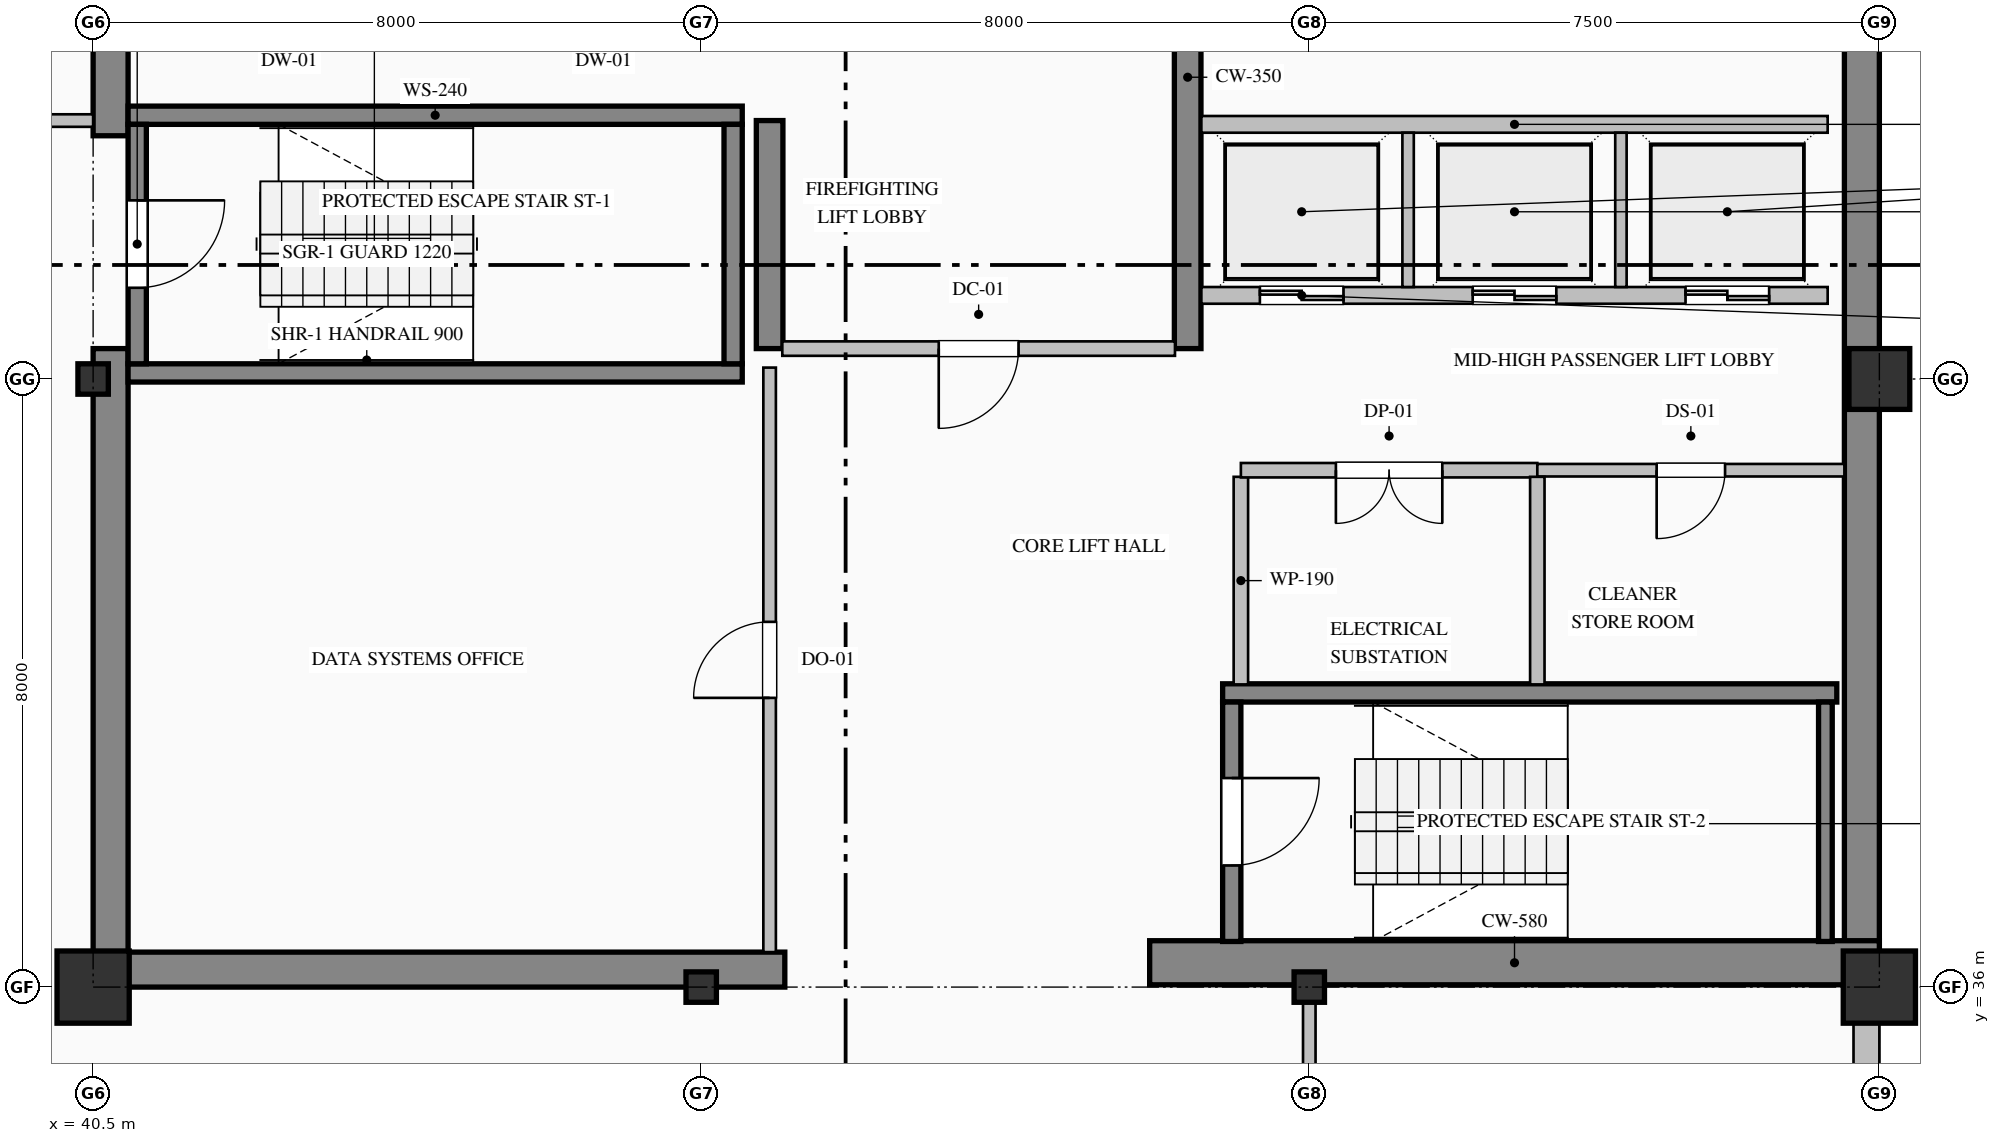
"""IFC4 building model, lengths in metres.
Left out: names, types, materials, properties, quantities, classifications, styles, units other than length and angle.
Written with IfcOpenShell. Run it as: python <this file> out.ifc"""

import sys

from ifc_helpers import new_model, si_unit, direction, frame, frame_2d, origin, origin_2d, place, context, subcontext, project, spatial, rectangle, hollow_rectangle, i_section, extrude, element, fill, save


model = new_model("IFC4")
c1 = context("Model", 3, precision=1e-05, world=origin(), true_north=direction((0.0, 1.0)))
c2 = subcontext(c1, "Body", "Model", "MODEL_VIEW")
j1 = project(units=[si_unit("LENGTHUNIT", "METRE"), si_unit("PLANEANGLEUNIT", "RADIAN")], contexts=[c1])
p1 = place(None, origin())
s1 = spatial("IfcSite", under=j1, at=p1, CompositionType="ELEMENT")
p2 = place(p1, origin())
s2 = spatial("IfcBuilding", under=s1, at=p2, CompositionType="ELEMENT")
p3 = place(p2, frame((0.0, 0.0, 217.8)))
s3 = spatial("IfcBuildingStorey", under=s2, at=p3, CompositionType="ELEMENT", Elevation=217.8)
p4 = place(p3, frame((63.77, 36.32, 0.0), z_axis=(0.0, 0.0, 1.0), x_axis=(0.0, 1.0, 0.0)))
e1 = element("IfcWall", 1, at=p4, inside=s3, PredefinedType="SHEAR", context=c2, shape_type="SweptSolid", body=[
    extrude(rectangle(XDim=15.22, YDim=0.46, at=frame_2d((7.61, 0.0))), origin(), (0.0, 0.0, 1.0), 3.775),
])
p5 = place(p3, frame((40.73, 36.46, 0.0), z_axis=(0.0, 0.0, 1.0), x_axis=(0.0, 1.0, 0.0)))
e2 = element("IfcWall", 2, at=p5, inside=s3, PredefinedType="SHEAR", context=c2, shape_type="SweptSolid", body=[
    extrude(rectangle(XDim=7.94, YDim=0.46, at=frame_2d((3.97, 0.0))), origin(), (0.0, 0.0, 1.0), 3.775),
])
p6 = place(p3, frame((40.73, 47.2, 0.0), z_axis=(0.0, 0.0, 1.0), x_axis=(0.0, 1.0, 0.0)))
e3 = element("IfcWall", 3, at=p6, inside=s3, PredefinedType="SHEAR", context=c2, shape_type="SweptSolid", body=[
    extrude(rectangle(XDim=4.34, YDim=0.46, at=frame_2d((2.17, 0.0))), origin(), (0.0, 0.0, 1.0), 3.775),
])
p7 = place(p3, frame((40.5, 36.23, 0.0), z_axis=(0.0, 0.0, 1.0), x_axis=(1.0, 0.0, 0.0)))
e4 = element("IfcWall", 4, at=p7, inside=s3, PredefinedType="SHEAR", context=c2, shape_type="SweptSolid", body=[
    extrude(rectangle(XDim=9.1, YDim=0.46, at=frame_2d((4.55, 0.0))), origin(), (0.0, 0.0, 1.0), 3.775),
])
p8 = place(p3, frame((54.4, 36.32, 0.0), z_axis=(0.0, 0.0, 1.0), x_axis=(1.0, 0.0, 0.0)))
e5 = element("IfcWall", 5, at=p8, inside=s3, PredefinedType="SHEAR", context=c2, shape_type="SweptSolid", body=[
    extrude(rectangle(XDim=9.6, YDim=0.58, at=frame_2d((4.8, 0.0))), origin(), (0.0, 0.0, 1.0), 4.0),
])
p9 = place(p3, frame((49.4, 44.4, 0.0), z_axis=(0.0, 0.0, 1.0), x_axis=(0.0, 1.0, 0.0)))
e6 = element("IfcWall", 6, at=p9, inside=s3, PredefinedType="SHEAR", context=c2, shape_type="SweptSolid", body=[
    extrude(rectangle(XDim=3.0, YDim=0.35, at=frame_2d((1.5, 0.0))), origin(), (0.0, 0.0, 1.0), 3.775),
])
p10 = place(p3, frame((54.9, 44.4, 0.0), z_axis=(0.0, 0.0, 1.0), x_axis=(0.0, 1.0, 0.0)))
e7 = element("IfcWall", 7, at=p10, inside=s3, PredefinedType="SHEAR", context=c2, shape_type="SweptSolid", body=[
    extrude(rectangle(XDim=7.14, YDim=0.35, at=frame_2d((3.57, 0.0))), origin(), (0.0, 0.0, 1.0), 3.775),
])
p11 = place(p3, frame((40.5, 36.0, 0.0), z_axis=(0.0, 0.0, 1.0), x_axis=(1.0, 0.0, 0.0)))
e8 = element("IfcColumn", 8, at=p11, inside=s3, PredefinedType="COLUMN", context=c2, shape_type="SweptSolid", body=[
    extrude(hollow_rectangle(XDim=0.95, YDim=0.95, WallThickness=0.036, at=origin_2d()), origin(), (0.0, 0.0, 1.0), 4.0),
])
for number, where, z_axis, x_axis in (
    (9, (40.5, 44.0, 0.0), (0.0, 0.0, 1.0), (1.0, 0.0, 0.0)),
    (10, (48.5, 36.0, 0.0), (0.0, 0.0, 1.0), (1.0, 0.0, 0.0)),
    (11, (56.5, 36.0, 0.0), (0.0, 0.0, 1.0), (1.0, 0.0, 0.0)),
):
    element("IfcColumn", number, at=place(p3, frame(where, z_axis=z_axis, x_axis=x_axis)), inside=s3, PredefinedType="COLUMN", context=c2, shape_type="SweptSolid", body=[
        extrude(i_section(OverallWidth=0.4, OverallDepth=0.4, WebThickness=0.013, FlangeThickness=0.021, FilletRadius=0.022, at=origin_2d()), origin(), (0.0, 0.0, 1.0), 4.0),
    ])
p12 = place(p3, frame((64.0, 36.0, 0.0), z_axis=(0.0, 0.0, 1.0), x_axis=(1.0, 0.0, 0.0)))
e12 = element("IfcColumn", 12, at=p12, inside=s3, PredefinedType="COLUMN", context=c2, shape_type="SweptSolid", body=[
    extrude(hollow_rectangle(XDim=0.95, YDim=0.95, WallThickness=0.036, at=origin_2d()), origin(), (0.0, 0.0, 1.0), 4.0),
])
p13 = place(p3, frame((64.0, 44.0, 0.0), z_axis=(0.0, 0.0, 1.0), x_axis=(1.0, 0.0, 0.0)))
e13 = element("IfcColumn", 13, at=p13, inside=s3, PredefinedType="COLUMN", context=c2, shape_type="SweptSolid", body=[
    extrude(hollow_rectangle(XDim=0.8, YDim=0.8, WallThickness=0.032, at=origin_2d()), origin(), (0.0, 0.0, 1.0), 4.0),
])
p14 = place(p3, frame((63.83, 36.05, 0.0), z_axis=(0.0, 0.0, 1.0), x_axis=(0.0, -1.0, 0.0)))
e14 = element("IfcWall", 14, at=p14, inside=s3, PredefinedType="SOLIDWALL", context=c2, shape_type="SweptSolid", body=[
    extrude(rectangle(XDim=19.55, YDim=0.34, at=frame_2d((9.775, 0.0))), origin(), (0.0, 0.0, 1.0), 3.325),
])
p15 = place(p14, frame((2.925, 0.0, 0.9)))
e15 = element("IfcOpeningElement", 15, at=p15, cuts=e14, PredefinedType="OPENING", context=c2, shape_type="SweptSolid", body=[
    extrude(rectangle(XDim=1.35, YDim=1.85, at=frame_2d((0.675, 0.925))), frame((0.0, 0.18, 0.0), z_axis=(0.0, -1.0, 0.0), x_axis=(1.0, 0.0, 0.0)), (0.0, 0.0, 1.0), 0.36),
])
p16 = place(p14, frame((10.2, 0.0, 0.9)))
e16 = element("IfcOpeningElement", 16, at=p16, cuts=e14, PredefinedType="OPENING", context=c2, shape_type="SweptSolid", body=[
    extrude(rectangle(XDim=1.2, YDim=1.85, at=frame_2d((0.6, 0.925))), frame((0.0, 0.18, 0.0), z_axis=(0.0, -1.0, 0.0), x_axis=(1.0, 0.0, 0.0)), (0.0, 0.0, 1.0), 0.36),
])
p17 = place(p14, frame((13.725, 0.0, 0.9)))
e17 = element("IfcOpeningElement", 17, at=p17, cuts=e14, PredefinedType="OPENING", context=c2, shape_type="SweptSolid", body=[
    extrude(rectangle(XDim=1.35, YDim=1.85, at=frame_2d((0.675, 0.925))), frame((0.0, 0.18, 0.0), z_axis=(0.0, -1.0, 0.0), x_axis=(1.0, 0.0, 0.0)), (0.0, 0.0, 1.0), 0.36),
])
for number, where, z_axis, x_axis in (
    (18, (40.96, 47.47, 0.0), (0.0, 0.0, 1.0), (1.0, 0.0, 0.0)),
    (19, (49.04, 44.08, 0.0), (0.0, 0.0, 1.0), (-1.0, 0.0, 0.0)),
):
    element("IfcWall", number, at=place(p3, frame(where, z_axis=z_axis, x_axis=x_axis)), inside=s3, PredefinedType="SOLIDWALL", context=c2, shape_type="SweptSolid", body=[
        extrude(rectangle(XDim=8.08, YDim=0.24, at=frame_2d((4.04, 0.0))), origin(), (0.0, 0.0, 1.0), 4.0),
    ])
p18 = place(p3, frame((41.08, 47.35, 0.0), z_axis=(0.0, 0.0, 1.0), x_axis=(0.0, -1.0, 0.0)))
e20 = element("IfcWall", 20, at=p18, inside=s3, PredefinedType="SOLIDWALL", context=c2, shape_type="SweptSolid", body=[
    extrude(rectangle(XDim=3.15, YDim=0.24, at=frame_2d((1.575, 0.0))), origin(), (0.0, 0.0, 1.0), 4.0),
])
p19 = place(p18, frame((1.0, 0.0, 0.0)))
e21 = element("IfcOpeningElement", 21, at=p19, cuts=e20, PredefinedType="OPENING", context=c2, shape_type="SweptSolid", body=[
    extrude(rectangle(XDim=1.15, YDim=2.2, at=frame_2d((0.575, 1.1))), frame((0.0, 0.13, 0.0), z_axis=(0.0, -1.0, 0.0), x_axis=(1.0, 0.0, 0.0)), (0.0, 0.0, 1.0), 0.26),
])
p20 = place(p3, frame((48.92, 44.2, 0.0), z_axis=(0.0, 0.0, 1.0), x_axis=(0.0, 1.0, 0.0)))
e22 = element("IfcWall", 22, at=p20, inside=s3, PredefinedType="SOLIDWALL", context=c2, shape_type="SweptSolid", body=[
    extrude(rectangle(XDim=3.15, YDim=0.24, at=frame_2d((1.575, 0.0))), origin(), (0.0, 0.0, 1.0), 4.0),
])
p21 = place(p3, frame((55.36, 39.87, 0.0), z_axis=(0.0, 0.0, 1.0), x_axis=(1.0, 0.0, 0.0)))
e23 = element("IfcWall", 23, at=p21, inside=s3, PredefinedType="SOLIDWALL", context=c2, shape_type="SweptSolid", body=[
    extrude(rectangle(XDim=8.08, YDim=0.24, at=frame_2d((4.04, 0.0))), origin(), (0.0, 0.0, 1.0), 4.0),
])
p22 = place(p3, frame((55.48, 39.75, 0.0), z_axis=(0.0, 0.0, 1.0), x_axis=(0.0, -1.0, 0.0)))
e24 = element("IfcWall", 24, at=p22, inside=s3, PredefinedType="SOLIDWALL", context=c2, shape_type="SweptSolid", body=[
    extrude(rectangle(XDim=3.15, YDim=0.24, at=frame_2d((1.575, 0.0))), origin(), (0.0, 0.0, 1.0), 4.0),
])
p23 = place(p22, frame((1.0, 0.0, 0.0)))
e25 = element("IfcOpeningElement", 25, at=p23, cuts=e24, PredefinedType="OPENING", context=c2, shape_type="SweptSolid", body=[
    extrude(rectangle(XDim=1.15, YDim=2.2, at=frame_2d((0.575, 1.1))), frame((0.0, 0.13, 0.0), z_axis=(0.0, -1.0, 0.0), x_axis=(1.0, 0.0, 0.0)), (0.0, 0.0, 1.0), 0.26),
])
p24 = place(p3, frame((63.29, 36.6, 0.0), z_axis=(0.0, 0.0, 1.0), x_axis=(0.0, 1.0, 0.0)))
e26 = element("IfcWall", 26, at=p24, inside=s3, PredefinedType="SOLIDWALL", context=c2, shape_type="SweptSolid", body=[
    extrude(rectangle(XDim=3.15, YDim=0.18, at=frame_2d((1.575, 0.0))), origin(), (0.0, 0.0, 1.0), 4.0),
])
p25 = place(p3, frame((63.32, 45.1, 0.0), z_axis=(0.0, 0.0, 1.0), x_axis=(-1.0, 0.0, 0.0)))
e27 = element("IfcWall", 27, at=p25, inside=s3, PredefinedType="PARTITIONING", context=c2, shape_type="SweptSolid", body=[
    extrude(rectangle(XDim=8.24, YDim=0.22, at=frame_2d((4.12, 0.0))), origin(), (0.0, 0.0, 1.0), 3.775),
])
p26 = place(p25, frame((6.37, 0.0, 0.0)))
e28 = element("IfcOpeningElement", 28, at=p26, cuts=e27, PredefinedType="OPENING", context=c2, shape_type="SweptSolid", body=[
    extrude(rectangle(XDim=1.1, YDim=2.2, at=frame_2d((0.55, 1.1))), frame((0.0, 0.12, 0.0), z_axis=(0.0, -1.0, 0.0), x_axis=(1.0, 0.0, 0.0)), (0.0, 0.0, 1.0), 0.24),
])
p27 = place(p25, frame((3.57, 0.0, 0.0)))
e29 = element("IfcOpeningElement", 29, at=p27, cuts=e27, PredefinedType="OPENING", context=c2, shape_type="SweptSolid", body=[
    extrude(rectangle(XDim=1.1, YDim=2.2, at=frame_2d((0.55, 1.1))), frame((0.0, 0.12, 0.0), z_axis=(0.0, -1.0, 0.0), x_axis=(1.0, 0.0, 0.0)), (0.0, 0.0, 1.0), 0.24),
])
p28 = place(p25, frame((0.77, 0.0, 0.0)))
e30 = element("IfcOpeningElement", 30, at=p28, cuts=e27, PredefinedType="OPENING", context=c2, shape_type="SweptSolid", body=[
    extrude(rectangle(XDim=1.1, YDim=2.2, at=frame_2d((0.55, 1.1))), frame((0.0, 0.12, 0.0), z_axis=(0.0, -1.0, 0.0), x_axis=(1.0, 0.0, 0.0)), (0.0, 0.0, 1.0), 0.24),
])
p29 = place(p3, frame((55.08, 47.35, 0.0), z_axis=(0.0, 0.0, 1.0), x_axis=(1.0, 0.0, 0.0)))
e31 = element("IfcWall", 31, at=p29, inside=s3, PredefinedType="PARTITIONING", context=c2, shape_type="SweptSolid", body=[
    extrude(rectangle(XDim=8.24, YDim=0.22, at=frame_2d((4.12, 0.0))), origin(), (0.0, 0.0, 1.0), 3.775),
])
for number, where, z_axis, x_axis in (
    (32, (57.8, 45.21, 0.0), (0.0, 0.0, 1.0), (0.0, 1.0, 0.0)),
    (33, (60.6, 45.21, 0.0), (0.0, 0.0, 1.0), (0.0, 1.0, 0.0)),
):
    element("IfcWall", number, at=place(p3, frame(where, z_axis=z_axis, x_axis=x_axis)), inside=s3, PredefinedType="PARTITIONING", context=c2, shape_type="SweptSolid", body=[
        extrude(rectangle(XDim=2.03, YDim=0.15, at=frame_2d((1.015, 0.0))), origin(), (0.0, 0.0, 1.0), 3.775),
    ])
p30 = place(p3, frame((37.8, 47.4, 0.0), z_axis=(0.0, 0.0, 1.0), x_axis=(1.0, 0.0, 0.0)))
e34 = element("IfcWall", 34, at=p30, inside=s3, PredefinedType="PARTITIONING", context=c2, shape_type="SweptSolid", body=[
    extrude(rectangle(XDim=2.7, YDim=0.165, at=frame_2d((1.35, 0.0))), origin(), (0.0, 0.0, 1.0), 3.775),
])
p31 = place(p30, frame((0.825, 0.0, 0.0)))
e35 = element("IfcOpeningElement", 35, at=p31, cuts=e34, PredefinedType="OPENING", context=c2, shape_type="SweptSolid", body=[
    extrude(rectangle(XDim=1.05, YDim=2.15, at=frame_2d((0.525, 1.075))), frame((0.0, 0.093, 0.0), z_axis=(0.0, -1.0, 0.0), x_axis=(1.0, 0.0, 0.0)), (0.0, 0.0, 1.0), 0.185),
])
p32 = place(p3, frame((54.733, 44.4, 0.0), z_axis=(0.0, 0.0, 1.0), x_axis=(-1.0, 0.0, 0.0)))
e36 = element("IfcWall", 36, at=p32, inside=s3, PredefinedType="PARTITIONING", context=c2, shape_type="SweptSolid", body=[
    extrude(rectangle(XDim=5.166, YDim=0.19, at=frame_2d((2.583, 0.0))), origin(), (0.0, 0.0, 1.0), 3.775),
])
p33 = place(p32, frame((2.058, 0.0, 0.0)))
e37 = element("IfcOpeningElement", 37, at=p33, cuts=e36, PredefinedType="OPENING", context=c2, shape_type="SweptSolid", body=[
    extrude(rectangle(XDim=1.05, YDim=2.15, at=frame_2d((0.525, 1.075))), frame((0.0, 0.105, 0.0), z_axis=(0.0, -1.0, 0.0), x_axis=(1.0, 0.0, 0.0)), (0.0, 0.0, 1.0), 0.21),
])
p34 = place(p3, frame((49.4, 36.46, 0.0), z_axis=(0.0, 0.0, 1.0), x_axis=(0.0, 1.0, 0.0)))
e38 = element("IfcWall", 38, at=p34, inside=s3, PredefinedType="PARTITIONING", context=c2, shape_type="SweptSolid", body=[
    extrude(rectangle(XDim=7.69, YDim=0.165, at=frame_2d((3.845, 0.0))), origin(), (0.0, 0.0, 1.0), 3.017),
])
p35 = place(p34, frame((3.345, 0.0, 0.0)))
e39 = element("IfcOpeningElement", 39, at=p35, cuts=e38, PredefinedType="OPENING", context=c2, shape_type="SweptSolid", body=[
    extrude(rectangle(XDim=1.0, YDim=2.15, at=frame_2d((0.5, 1.075))), frame((0.0, 0.093, 0.0), z_axis=(0.0, -1.0, 0.0), x_axis=(1.0, 0.0, 0.0)), (0.0, 0.0, 1.0), 0.185),
])
p36 = place(p3, frame((55.6, 42.713, 0.0), z_axis=(0.0, 0.0, 1.0), x_axis=(0.0, -1.0, 0.0)))
e40 = element("IfcWall", 40, at=p36, inside=s3, PredefinedType="PARTITIONING", context=c2, shape_type="SweptSolid", body=[
    extrude(rectangle(XDim=2.731, YDim=0.19, at=frame_2d((1.365, 0.0))), origin(), (0.0, 0.0, 1.0), 3.775),
])
p37 = place(p3, frame((59.5, 42.8, 0.0), z_axis=(0.0, 0.0, 1.0), x_axis=(-1.0, 0.0, 0.0)))
e41 = element("IfcWall", 41, at=p37, inside=s3, PredefinedType="PARTITIONING", context=c2, shape_type="SweptSolid", body=[
    extrude(rectangle(XDim=3.9, YDim=0.19, at=frame_2d((1.95, 0.0))), origin(), (0.0, 0.0, 1.0), 3.775),
])
p38 = place(p37, frame((1.25, 0.0, 0.0)))
e42 = element("IfcOpeningElement", 42, at=p38, cuts=e41, PredefinedType="OPENING", context=c2, shape_type="SweptSolid", body=[
    extrude(rectangle(XDim=1.4, YDim=2.25, at=frame_2d((0.7, 1.125))), frame((0.0, 0.105, 0.0), z_axis=(0.0, -1.0, 0.0), x_axis=(1.0, 0.0, 0.0)), (0.0, 0.0, 1.0), 0.21),
])
p39 = place(p3, frame((63.54, 42.8, 0.0), z_axis=(0.0, 0.0, 1.0), x_axis=(-1.0, 0.0, 0.0)))
e43 = element("IfcWall", 43, at=p39, inside=s3, PredefinedType="PARTITIONING", context=c2, shape_type="SweptSolid", body=[
    extrude(rectangle(XDim=4.04, YDim=0.165, at=frame_2d((2.02, 0.0))), origin(), (0.0, 0.0, 1.0), 3.775),
])
p40 = place(p39, frame((1.57, 0.0, 0.0)))
e44 = element("IfcOpeningElement", 44, at=p40, cuts=e43, PredefinedType="OPENING", context=c2, shape_type="SweptSolid", body=[
    extrude(rectangle(XDim=0.9, YDim=2.15, at=frame_2d((0.45, 1.075))), frame((0.0, 0.093, 0.0), z_axis=(0.0, -1.0, 0.0), x_axis=(1.0, 0.0, 0.0)), (0.0, 0.0, 1.0), 0.185),
])
p41 = place(p3, frame((59.5, 42.713, 0.0), z_axis=(0.0, 0.0, 1.0), x_axis=(0.0, -1.0, 0.0)))
e45 = element("IfcWall", 45, at=p41, inside=s3, PredefinedType="PARTITIONING", context=c2, shape_type="SweptSolid", body=[
    extrude(rectangle(XDim=2.731, YDim=0.19, at=frame_2d((1.365, 0.0))), origin(), (0.0, 0.0, 1.0), 3.775),
])
p42 = place(p3, frame((56.5, 36.0, 0.0), z_axis=(0.0, 0.0, 1.0), x_axis=(0.0, -1.0, 0.0)))
e46 = element("IfcWall", 46, at=p42, inside=s3, PredefinedType="PARTITIONING", context=c2, shape_type="SweptSolid", body=[
    extrude(rectangle(XDim=5.525, YDim=0.165, at=frame_2d((2.763, 0.0))), origin(), (0.0, 0.0, 1.0), 3.179),
])
p43 = place(p19, origin())
e47 = element("IfcDoor", 47, at=p43, inside=s3, OperationType="SINGLE_SWING_LEFT", PredefinedType="DOOR", context=c2, shape_type="SweptSolid", body=[
    extrude(rectangle(XDim=1.15, YDim=2.2, at=frame_2d((0.575, 1.1))), frame((0.0, 0.025, 0.0), z_axis=(0.0, -1.0, 0.0), x_axis=(1.0, 0.0, 0.0)), (0.0, 0.0, 1.0), 0.05),
])
fill(e21, e47)
p44 = place(p23, origin())
e48 = element("IfcDoor", 48, at=p44, inside=s3, OperationType="SINGLE_SWING_LEFT", PredefinedType="DOOR", context=c2, shape_type="SweptSolid", body=[
    extrude(rectangle(XDim=1.15, YDim=2.2, at=frame_2d((0.575, 1.1))), frame((0.0, 0.025, 0.0), z_axis=(0.0, -1.0, 0.0), x_axis=(1.0, 0.0, 0.0)), (0.0, 0.0, 1.0), 0.05),
])
fill(e25, e48)
p45 = place(p26, origin())
e49 = element("IfcDoor", 49, at=p45, inside=s3, OperationType="DOUBLE_DOOR_SLIDING", PredefinedType="DOOR", context=c2, shape_type="SweptSolid", body=[
    extrude(rectangle(XDim=1.1, YDim=2.2, at=frame_2d((0.55, 1.1))), frame((0.0, 0.025, 0.0), z_axis=(0.0, -1.0, 0.0), x_axis=(1.0, 0.0, 0.0)), (0.0, 0.0, 1.0), 0.05),
])
fill(e28, e49)
p46 = place(p27, origin())
e50 = element("IfcDoor", 50, at=p46, inside=s3, OperationType="DOUBLE_DOOR_SLIDING", PredefinedType="DOOR", context=c2, shape_type="SweptSolid", body=[
    extrude(rectangle(XDim=1.1, YDim=2.2, at=frame_2d((0.55, 1.1))), frame((0.0, 0.025, 0.0), z_axis=(0.0, -1.0, 0.0), x_axis=(1.0, 0.0, 0.0)), (0.0, 0.0, 1.0), 0.05),
])
fill(e29, e50)
p47 = place(p28, origin())
e51 = element("IfcDoor", 51, at=p47, inside=s3, OperationType="DOUBLE_DOOR_SLIDING", PredefinedType="DOOR", context=c2, shape_type="SweptSolid", body=[
    extrude(rectangle(XDim=1.1, YDim=2.2, at=frame_2d((0.55, 1.1))), frame((0.0, 0.025, 0.0), z_axis=(0.0, -1.0, 0.0), x_axis=(1.0, 0.0, 0.0)), (0.0, 0.0, 1.0), 0.05),
])
fill(e30, e51)
p48 = place(p33, origin())
e52 = element("IfcDoor", 52, at=p48, inside=s3, OperationType="SINGLE_SWING_RIGHT", PredefinedType="DOOR", context=c2, shape_type="SweptSolid", body=[
    extrude(rectangle(XDim=1.05, YDim=2.15, at=frame_2d((0.525, 1.075))), frame((0.0, 0.025, 0.0), z_axis=(0.0, -1.0, 0.0), x_axis=(1.0, 0.0, 0.0)), (0.0, 0.0, 1.0), 0.05),
])
fill(e37, e52)
p49 = place(p35, origin())
e53 = element("IfcDoor", 53, at=p49, inside=s3, OperationType="SINGLE_SWING_LEFT", PredefinedType="DOOR", context=c2, shape_type="SweptSolid", body=[
    extrude(rectangle(XDim=1.0, YDim=2.15, at=frame_2d((0.5, 1.075))), frame((0.0, 0.025, 0.0), z_axis=(0.0, -1.0, 0.0), x_axis=(1.0, 0.0, 0.0)), (0.0, 0.0, 1.0), 0.05),
])
fill(e39, e53)
p50 = place(p38, origin())
e54 = element("IfcDoor", 54, at=p50, inside=s3, OperationType="DOUBLE_DOOR_SINGLE_SWING", PredefinedType="DOOR", context=c2, shape_type="SweptSolid", body=[
    extrude(rectangle(XDim=1.4, YDim=2.25, at=frame_2d((0.7, 1.125))), frame((0.0, 0.025, 0.0), z_axis=(0.0, -1.0, 0.0), x_axis=(1.0, 0.0, 0.0)), (0.0, 0.0, 1.0), 0.05),
])
fill(e42, e54)
p51 = place(p40, origin())
e55 = element("IfcDoor", 55, at=p51, inside=s3, OperationType="SINGLE_SWING_RIGHT", PredefinedType="DOOR", context=c2, shape_type="SweptSolid", body=[
    extrude(rectangle(XDim=0.9, YDim=2.15, at=frame_2d((0.45, 1.075))), frame((0.0, 0.025, 0.0), z_axis=(0.0, -1.0, 0.0), x_axis=(1.0, 0.0, 0.0)), (0.0, 0.0, 1.0), 0.05),
])
fill(e44, e55)
save(model, sys.argv[1])
